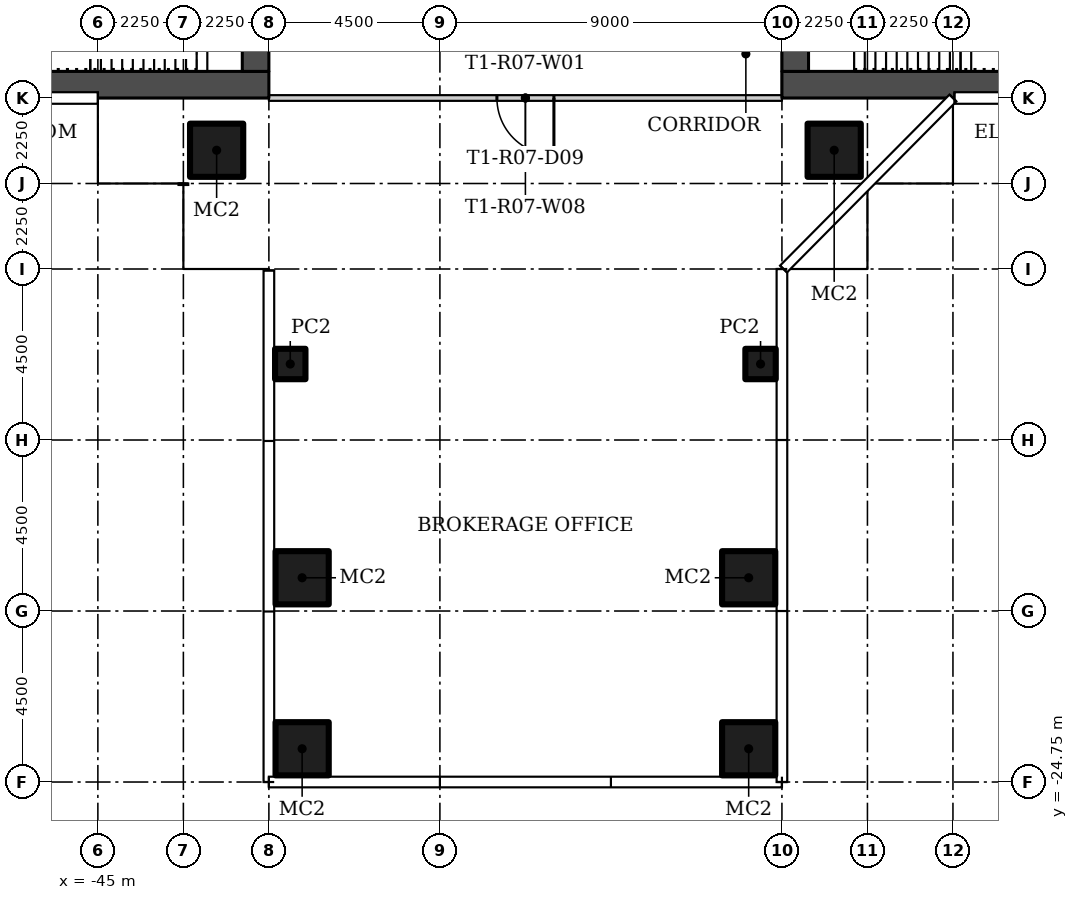
"""IFC4 building model, lengths in metres.
Left out: names, types, materials, properties, quantities, classifications, styles, units other than length and angle.
Written with IfcOpenShell. Run it as: python <this file> out.ifc"""

import sys

from ifc_helpers import new_model, si_unit, direction, frame, frame_2d, origin, origin_2d, place, context, subcontext, project, spatial, rectangle, hollow_rectangle, extrude, element, fill, save


model = new_model("IFC4")
c1 = context("Model", 3, precision=1e-05, world=origin(), true_north=direction((0.0, 1.0)))
c2 = subcontext(c1, "Body", "Model", "MODEL_VIEW")
j1 = project(units=[si_unit("LENGTHUNIT", "METRE"), si_unit("PLANEANGLEUNIT", "RADIAN")], contexts=[c1])
p1 = place(None, origin())
s1 = spatial("IfcSite", under=j1, at=p1, CompositionType="ELEMENT")
p2 = place(p1, origin())
s2 = spatial("IfcBuilding", under=s1, at=p2, CompositionType="ELEMENT")
p3 = place(p2, frame((0.0, 0.0, 73.2)))
s3 = spatial("IfcBuildingStorey", under=s2, at=p3, CompositionType="ELEMENT", Elevation=73.2)
for number, where in (
    (1, (-25.625, -8.125, 0.0)),
    (2, (-41.875, -8.125, 0.0)),
):
    element("IfcColumn", number, at=place(p3, frame(where)), inside=s3, PredefinedType="COLUMN", context=c2, shape_type="SweptSolid", body=[
        extrude(hollow_rectangle(XDim=1.4, YDim=1.4, WallThickness=0.05, at=origin_2d()), origin(), (0.0, 0.0, 1.0), 3.45),
    ])
p4 = place(p3, frame((-39.938, -13.75, 0.0)))
e3 = element("IfcColumn", 3, at=p4, inside=s3, PredefinedType="COLUMN", context=c2, shape_type="SweptSolid", body=[
    extrude(hollow_rectangle(XDim=0.8, YDim=0.8, WallThickness=0.025, at=origin_2d()), origin(), (0.0, 0.0, 1.0), 3.45),
])
for number, where in (
    (4, (-39.625, -19.375, 0.0)),
    (5, (-39.625, -23.875, 0.0)),
):
    element("IfcColumn", number, at=place(p3, frame(where)), inside=s3, PredefinedType="COLUMN", context=c2, shape_type="SweptSolid", body=[
        extrude(hollow_rectangle(XDim=1.4, YDim=1.4, WallThickness=0.05, at=origin_2d()), origin(), (0.0, 0.0, 1.0), 3.45),
    ])
p5 = place(p3, frame((-27.562, -13.75, 0.0)))
e6 = element("IfcColumn", 6, at=p5, inside=s3, PredefinedType="COLUMN", context=c2, shape_type="SweptSolid", body=[
    extrude(hollow_rectangle(XDim=0.8, YDim=0.8, WallThickness=0.025, at=origin_2d()), origin(), (0.0, 0.0, 1.0), 3.45),
])
for number, where in (
    (7, (-27.875, -19.375, 0.0)),
    (8, (-27.875, -23.875, 0.0)),
):
    element("IfcColumn", number, at=place(p3, frame(where)), inside=s3, PredefinedType="COLUMN", context=c2, shape_type="SweptSolid", body=[
        extrude(hollow_rectangle(XDim=1.4, YDim=1.4, WallThickness=0.05, at=origin_2d()), origin(), (0.0, 0.0, 1.0), 3.45),
    ])
p6 = place(p3, frame((-27.0, -6.75, 0.0), z_axis=(0.0, 0.0, 1.0), x_axis=(-1.0, 0.0, 0.0)))
e9 = element("IfcWall", 9, at=p6, inside=s3, PredefinedType="PARTITIONING", context=c2, shape_type="SweptSolid", body=[
    extrude(rectangle(XDim=13.5, YDim=0.15, at=frame_2d((6.75, 0.0))), origin(), (0.0, 0.0, 1.0), 3.45),
])
p7 = place(p6, frame((6.0, 0.0, 0.0)))
e10 = element("IfcOpeningElement", 10, at=p7, cuts=e9, PredefinedType="OPENING", context=c2, shape_type="SweptSolid", body=[
    extrude(rectangle(XDim=1.5, YDim=2.1, at=frame_2d((0.75, 1.05))), frame((0.0, 0.085, 0.0), z_axis=(0.0, -1.0, 0.0), x_axis=(1.0, 0.0, 0.0)), (0.0, 0.0, 1.0), 0.17),
])
p8 = place(p3, frame((-27.0, -6.4, 0.0)))
e11 = element("IfcWall", 11, at=p8, inside=s3, PredefinedType="SHEAR", context=c2, shape_type="SweptSolid", body=[
    extrude(rectangle(XDim=13.5, YDim=0.7, at=frame_2d((6.75, 0.0))), origin(), (0.0, 0.0, 1.0), 3.45),
])
p9 = place(p3, frame((-26.65, 6.05, 0.0), z_axis=(0.0, 0.0, 1.0), x_axis=(0.0, -1.0, 0.0)))
e12 = element("IfcWall", 12, at=p9, inside=s3, PredefinedType="SHEAR", context=c2, shape_type="SweptSolid", body=[
    extrude(rectangle(XDim=12.1, YDim=0.7, at=frame_2d((6.05, 0.0))), origin(), (0.0, 0.0, 1.0), 3.45),
])
p10 = place(p9, frame((3.9, 0.0, 0.0)))
e13 = element("IfcOpeningElement", 13, at=p10, cuts=e12, PredefinedType="OPENING", context=c2, shape_type="SweptSolid", body=[
    extrude(rectangle(XDim=1.8, YDim=2.4, at=frame_2d((0.9, 1.2))), frame((0.0, 0.36, 0.0), z_axis=(0.0, -1.0, 0.0), x_axis=(1.0, 0.0, 0.0)), (0.0, 0.0, 1.0), 0.72),
])
p11 = place(p3, frame((-40.5, -6.4, 0.0), z_axis=(0.0, 0.0, 1.0), x_axis=(-1.0, 0.0, 0.0)))
e14 = element("IfcWall", 14, at=p11, inside=s3, PredefinedType="SHEAR", context=c2, shape_type="SweptSolid", body=[
    extrude(rectangle(XDim=13.5, YDim=0.7, at=frame_2d((6.75, 0.0))), origin(), (0.0, 0.0, 1.0), 3.45),
])
p12 = place(p3, frame((-40.85, -6.05, 0.0), z_axis=(0.0, 0.0, 1.0), x_axis=(0.0, 1.0, 0.0)))
e15 = element("IfcWall", 15, at=p12, inside=s3, PredefinedType="SHEAR", context=c2, shape_type="SweptSolid", body=[
    extrude(rectangle(XDim=12.1, YDim=0.7, at=frame_2d((6.05, 0.0))), origin(), (0.0, 0.0, 1.0), 3.45),
])
p13 = place(p12, frame((6.4, 0.0, 0.0)))
e16 = element("IfcOpeningElement", 16, at=p13, cuts=e15, PredefinedType="OPENING", context=c2, shape_type="SweptSolid", body=[
    extrude(rectangle(XDim=1.8, YDim=2.4, at=frame_2d((0.9, 1.2))), frame((0.0, 0.36, 0.0), z_axis=(0.0, -1.0, 0.0), x_axis=(1.0, 0.0, 0.0)), (0.0, 0.0, 1.0), 0.72),
])
p14 = place(p7, origin())
e17 = element("IfcDoor", 17, at=p14, inside=s3, OperationType="DOUBLE_DOOR_SINGLE_SWING", PredefinedType="DOOR", context=c2, shape_type="SweptSolid", body=[
    extrude(rectangle(XDim=1.5, YDim=2.1, at=frame_2d((0.75, 1.05))), frame((0.0, 0.025, 0.0), z_axis=(0.0, -1.0, 0.0), x_axis=(1.0, 0.0, 0.0)), (0.0, 0.0, 1.0), 0.05),
])
fill(e10, e17)
save(model, sys.argv[1])
